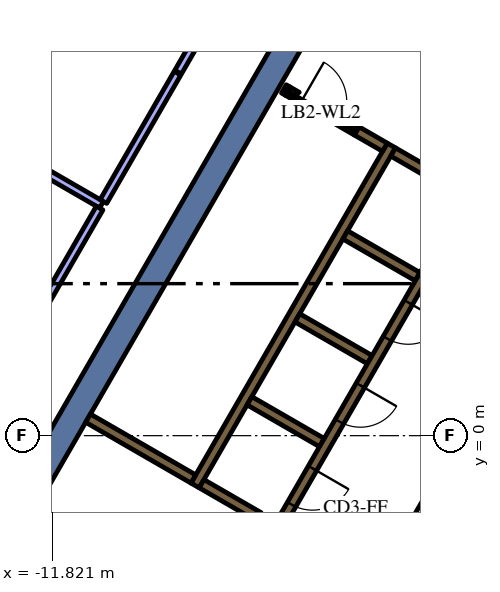
"""IFC4 building model, lengths in metres.
Left out: names, types, materials, properties, quantities, classifications, styles, units other than length and angle.
Written with IfcOpenShell. Run it as: python <this file> out.ifc"""

import sys

from ifc_helpers import new_model, si_unit, direction, frame, frame_2d, origin, place, context, subcontext, project, spatial, polyline, rectangle, outline, extrude, element, fill, save


model = new_model("IFC4")
c1 = context("Model", 3, precision=1e-05, world=origin(), true_north=direction((0.0, 1.0)))
c2 = subcontext(c1, "Body", "Model", "MODEL_VIEW")
j1 = project(units=[si_unit("LENGTHUNIT", "METRE"), si_unit("PLANEANGLEUNIT", "RADIAN")], contexts=[c1])
p1 = place(None, origin())
s1 = spatial("IfcSite", under=j1, at=p1, CompositionType="ELEMENT")
p2 = place(p1, origin())
s2 = spatial("IfcBuilding", under=s1, at=p2, CompositionType="ELEMENT")
p3 = place(p2, frame((0.0, 0.0, 218.4)))
s3 = spatial("IfcBuildingStorey", under=s2, at=p3, CompositionType="ELEMENT", Elevation=218.4)
p4 = place(p3, frame((-12.625, -1.867, 0.0), z_axis=(0.0, 0.0, 1.0), x_axis=(0.500008520515, 0.866020484407, 0.0)))
e1 = element("IfcWall", 1, at=p4, inside=s3, PredefinedType="SOLIDWALL", context=c2, shape_type="SweptSolid", body=[
    extrude(rectangle(XDim=15.859, YDim=0.7, at=frame_2d((7.929, 0.0))), origin(), (0.0, 0.0, 1.0), 4.2),
])
p5 = place(p3, frame((-8.06, -1.311, 0.0), z_axis=(0.0, 0.0, 1.0), x_axis=(0.50000273126, 0.866023826885, 0.0)))
e2 = element("IfcWall", 2, at=p5, inside=s3, PredefinedType="SOLIDWALL", context=c2, shape_type="SweptSolid", body=[
    extrude(rectangle(XDim=10.33, YDim=0.25, at=frame_2d((5.165, 0.0))), origin(), (0.0, 0.0, 1.0), 4.2),
])
p6 = place(p3, origin())
e3 = element("IfcWall", 3, at=p6, inside=s3, PredefinedType="SOLIDWALL", context=c2, shape_type="SweptSolid", body=[
    extrude(outline(polyline([(-2.912, 7.356), (-2.787, 7.573), (-1.232, 6.675), (-1.303, 6.675), (-1.304, 6.675), (-1.304, 6.675), (-1.304, 6.525), (-1.304, 6.525), (-1.303, 6.525), (-0.971, 6.525), (-0.665, 6.348), (-0.79, 6.132), (-1.007, 6.257), (-1.007, 6.257), (-2.912, 7.356)])), origin(), (0.0, 0.0, 1.0), 4.2),
])
for number, where, z_axis, x_axis in (
    (4, (-2.204, 4.182, 0.0), (0.0, 0.0, 1.0), (-0.866, 0.5, 0.0)),
    (5, (-5.369, 3.1, 0.0), (0.0, 0.0, 1.0), (0.866, -0.5, 0.0)),
    (6, (-4.724, -0.182, 0.0), (0.0, 0.0, 1.0), (-0.866, 0.5, 0.0)),
):
    element("IfcWall", number, at=place(p3, frame(where, z_axis=z_axis, x_axis=x_axis)), inside=s3, PredefinedType="SOLIDWALL", context=c2, shape_type="SweptSolid", body=[
        extrude(rectangle(XDim=2.2, YDim=0.25, at=frame_2d((1.1, 0.0))), origin(), (0.0, 0.0, 1.0), 4.2),
    ])
p7 = place(p3, frame((-7.889, -1.265, 0.0), z_axis=(0.0, 0.0, 1.0), x_axis=(0.865986741702, -0.500066958712, 0.0)))
e7 = element("IfcWall", 7, at=p7, inside=s3, PredefinedType="SOLIDWALL", context=c2, shape_type="SweptSolid", body=[
    extrude(rectangle(XDim=1.738, YDim=0.25, at=frame_2d((0.869, 0.0))), origin(), (0.0, 0.0, 1.0), 4.2),
])
p8 = place(p3, frame((-8.106, -1.14, 0.0), z_axis=(0.0, 0.0, 1.0), x_axis=(-0.866008981251, 0.500028443584, 0.0)))
e8 = element("IfcWall", 8, at=p8, inside=s3, PredefinedType="SOLIDWALL", context=c2, shape_type="SweptSolid", body=[
    extrude(rectangle(XDim=3.2, YDim=0.25, at=frame_2d((1.6, 0.0))), origin(), (0.0, 0.0, 1.0), 4.2),
])
p9 = place(p3, frame((-5.725, 9.125, 0.0), z_axis=(0.0, 0.0, 1.0), x_axis=(0.866185586049, -0.49972245349, 0.0)))
e9 = element("IfcWall", 9, at=p9, inside=s3, PredefinedType="SOLIDWALL", context=c2, shape_type="SweptSolid", body=[
    extrude(rectangle(XDim=0.11, YDim=0.25, at=frame_2d((0.055, 0.0))), origin(), (0.0, 0.0, 1.0), 4.2),
])
p10 = place(p3, frame((-3.066, 7.59, 0.0), z_axis=(0.0, 0.0, 1.0), x_axis=(-0.866081358704, 0.49990307071, 0.0)))
e10 = element("IfcWall", 10, at=p10, inside=s3, PredefinedType="SOLIDWALL", context=c2, shape_type="SweptSolid", body=[
    extrude(rectangle(XDim=0.858, YDim=0.25, at=frame_2d((0.429, 0.0))), origin(), (0.0, 0.0, 1.0), 4.2),
])
e11 = element("IfcWall", 11, at=p6, inside=s3, PredefinedType="SOLIDWALL", context=c2, shape_type="SweptSolid", body=[
    extrude(outline(polyline([(-3.748, 8.128), (-3.813, 8.015), (-4.027, 8.139), (-4.017, 8.156), (-4.008, 8.173), (-4.0, 8.192), (-3.995, 8.21), (-3.991, 8.23), (-3.99, 8.25), (-3.99, 8.268), (-3.748, 8.128)])), origin(), (0.0, 0.0, 1.0), 4.2),
])
e12 = element("IfcWall", 12, at=p6, inside=s3, PredefinedType="SOLIDWALL", context=c2, shape_type="SweptSolid", body=[
    extrude(outline(polyline([(-5.689, 8.96), (-5.69, 8.961), (-5.565, 9.177), (-5.319, 9.035), (-5.335, 9.026), (-5.351, 9.015), (-5.366, 9.002), (-5.379, 8.988), (-5.392, 8.972), (-5.402, 8.956), (-5.412, 8.939), (-5.629, 9.064), (-5.629, 9.064), (-5.689, 8.96)])), origin(), (0.0, 0.0, 1.0), 4.2),
])
p11 = place(p3, frame((-3.147, -3.718, 0.0), z_axis=(0.0, 0.0, 1.0), x_axis=(0.500010131483, 0.866019554291, 0.0)))
e13 = element("IfcWall", 13, at=p11, inside=s3, PredefinedType="PARTITIONING", context=c2, shape_type="SweptSolid", body=[
    extrude(rectangle(XDim=3.894, YDim=0.15, at=frame_2d((1.947, 0.0))), origin(), (0.0, 0.0, 1.0), 3.45),
])
p12 = place(p3, frame((-0.898, 6.194, 0.0), z_axis=(0.0, 0.0, 1.0), x_axis=(-0.499996202215, -0.866027596426, 0.0)))
e14 = element("IfcWall", 14, at=p12, inside=s3, PredefinedType="SOLIDWALL", context=c2, shape_type="SweptSolid", body=[
    extrude(rectangle(XDim=9.83, YDim=0.25, at=frame_2d((4.915, 0.0))), origin(), (0.0, 0.0, 1.0), 4.2),
])
p13 = place(p12, frame((0.585, 0.0, 0.0)))
e15 = element("IfcOpeningElement", 15, at=p13, cuts=e14, PredefinedType="OPENING", context=c2, shape_type="SweptSolid", body=[
    extrude(rectangle(XDim=1.1, YDim=2.1, at=frame_2d((0.55, 1.05))), frame((0.0, 0.135, 0.0), z_axis=(0.0, -1.0, 0.0), x_axis=(1.0, 0.0, 0.0)), (0.0, 0.0, 1.0), 0.27),
])
p14 = place(p12, frame((3.105, 0.0, 0.0)))
e16 = element("IfcOpeningElement", 16, at=p14, cuts=e14, PredefinedType="OPENING", context=c2, shape_type="SweptSolid", body=[
    extrude(rectangle(XDim=1.1, YDim=2.1, at=frame_2d((0.55, 1.05))), frame((0.0, 0.135, 0.0), z_axis=(0.0, -1.0, 0.0), x_axis=(1.0, 0.0, 0.0)), (0.0, 0.0, 1.0), 0.27),
])
p15 = place(p12, frame((5.625, 0.0, 0.0)))
e17 = element("IfcOpeningElement", 17, at=p15, cuts=e14, PredefinedType="OPENING", context=c2, shape_type="SweptSolid", body=[
    extrude(rectangle(XDim=1.1, YDim=2.1, at=frame_2d((0.55, 1.05))), frame((0.0, 0.135, 0.0), z_axis=(0.0, -1.0, 0.0), x_axis=(1.0, 0.0, 0.0)), (0.0, 0.0, 1.0), 0.27),
])
p16 = place(p12, frame((8.145, 0.0, 0.0)))
e18 = element("IfcOpeningElement", 18, at=p16, cuts=e14, PredefinedType="OPENING", context=c2, shape_type="SweptSolid", body=[
    extrude(rectangle(XDim=1.1, YDim=2.1, at=frame_2d((0.55, 1.05))), frame((0.0, 0.135, 0.0), z_axis=(0.0, -1.0, 0.0), x_axis=(1.0, 0.0, 0.0)), (0.0, 0.0, 1.0), 0.27),
])
p17 = place(p3, frame((-5.659, 9.012, 0.0), z_axis=(0.0, 0.0, 1.0), x_axis=(0.866009402589, -0.500027713859, 0.0)))
e19 = element("IfcWall", 19, at=p17, inside=s3, PredefinedType="PARTITIONING", context=c2, shape_type="SweptSolid", body=[
    extrude(rectangle(XDim=2.1, YDim=0.12, at=frame_2d((1.05, 0.0))), origin(), (0.0, 0.0, 1.0), 3.45),
])
p18 = place(p17, frame((0.45, 0.0, 0.0)))
e20 = element("IfcOpeningElement", 20, at=p18, cuts=e19, PredefinedType="OPENING", context=c2, shape_type="SweptSolid", body=[
    extrude(rectangle(XDim=1.2, YDim=2.1, at=frame_2d((0.6, 1.05))), frame((0.0, 0.07, 0.0), z_axis=(0.0, -1.0, 0.0), x_axis=(1.0, 0.0, 0.0)), (0.0, 0.0, 1.0), 0.14),
])
p19 = place(p3, frame((-10.522, 6.075, 0.0), z_axis=(0.0, 0.0, 1.0), x_axis=(-0.866002601515, 0.500039492609, 0.0)))
e21 = element("IfcWall", 21, at=p19, inside=s3, PredefinedType="PARTITIONING", context=c2, shape_type="SweptSolid", body=[
    extrude(rectangle(XDim=3.844, YDim=0.2, at=frame_2d((1.922, 0.0))), origin(), (0.0, 0.0, 1.0), 3.45),
])
p20 = place(p3, frame((-8.522, 9.539, 0.0), z_axis=(0.0, 0.0, 1.0), x_axis=(-0.499997012787, -0.866027128446, 0.0)))
e22 = element("IfcWall", 22, at=p20, inside=s3, PredefinedType="PARTITIONING", context=c2, shape_type="SweptSolid", body=[
    extrude(rectangle(XDim=3.9, YDim=0.2, at=frame_2d((1.95, 0.0))), origin(), (0.0, 0.0, 1.0), 3.45),
])
p21 = place(p3, frame((-5.75, 14.341, 0.0), z_axis=(0.0, 0.0, 1.0), x_axis=(-0.499995817524, -0.866027818524, 0.0)))
e23 = element("IfcWall", 23, at=p21, inside=s3, PredefinedType="PARTITIONING", context=c2, shape_type="SweptSolid", body=[
    extrude(rectangle(XDim=5.515, YDim=0.2, at=frame_2d((2.757, 0.0))), origin(), (0.0, 0.0, 1.0), 3.45),
])
p22 = place(p3, frame((-10.572, 5.988, 0.0), z_axis=(0.0, 0.0, 1.0), x_axis=(-0.499997012787, -0.866027128446, 0.0)))
e24 = element("IfcWall", 24, at=p22, inside=s3, PredefinedType="PARTITIONING", context=c2, shape_type="SweptSolid", body=[
    extrude(rectangle(XDim=3.9, YDim=0.2, at=frame_2d((1.95, 0.0))), origin(), (0.0, 0.0, 1.0), 3.45),
])
p23 = place(p14, origin())
e25 = element("IfcDoor", 25, at=p23, inside=s3, OperationType="DOUBLE_DOOR_SLIDING", PredefinedType="DOOR", context=c2, shape_type="SweptSolid", body=[
    extrude(rectangle(XDim=1.1, YDim=2.1, at=frame_2d((0.55, 1.05))), frame((0.0, 0.025, 0.0), z_axis=(0.0, -1.0, 0.0), x_axis=(1.0, 0.0, 0.0)), (0.0, 0.0, 1.0), 0.05),
])
fill(e16, e25)
p24 = place(p15, origin())
e26 = element("IfcDoor", 26, at=p24, inside=s3, OperationType="DOUBLE_DOOR_SLIDING", PredefinedType="DOOR", context=c2, shape_type="SweptSolid", body=[
    extrude(rectangle(XDim=1.1, YDim=2.1, at=frame_2d((0.55, 1.05))), frame((0.0, 0.025, 0.0), z_axis=(0.0, -1.0, 0.0), x_axis=(1.0, 0.0, 0.0)), (0.0, 0.0, 1.0), 0.05),
])
fill(e17, e26)
p25 = place(p16, origin())
e27 = element("IfcDoor", 27, at=p25, inside=s3, OperationType="DOUBLE_DOOR_SLIDING", PredefinedType="DOOR", context=c2, shape_type="SweptSolid", body=[
    extrude(rectangle(XDim=1.1, YDim=2.1, at=frame_2d((0.55, 1.05))), frame((0.0, 0.025, 0.0), z_axis=(0.0, -1.0, 0.0), x_axis=(1.0, 0.0, 0.0)), (0.0, 0.0, 1.0), 0.05),
])
fill(e18, e27)
p26 = place(p18, origin())
e28 = element("IfcDoor", 28, at=p26, inside=s3, OperationType="SINGLE_SWING_LEFT", PredefinedType="DOOR", context=c2, shape_type="SweptSolid", body=[
    extrude(rectangle(XDim=1.2, YDim=2.1, at=frame_2d((0.6, 1.05))), frame((0.0, 0.025, 0.0), z_axis=(0.0, -1.0, 0.0), x_axis=(1.0, 0.0, 0.0)), (0.0, 0.0, 1.0), 0.05),
])
fill(e20, e28)
save(model, sys.argv[1])
